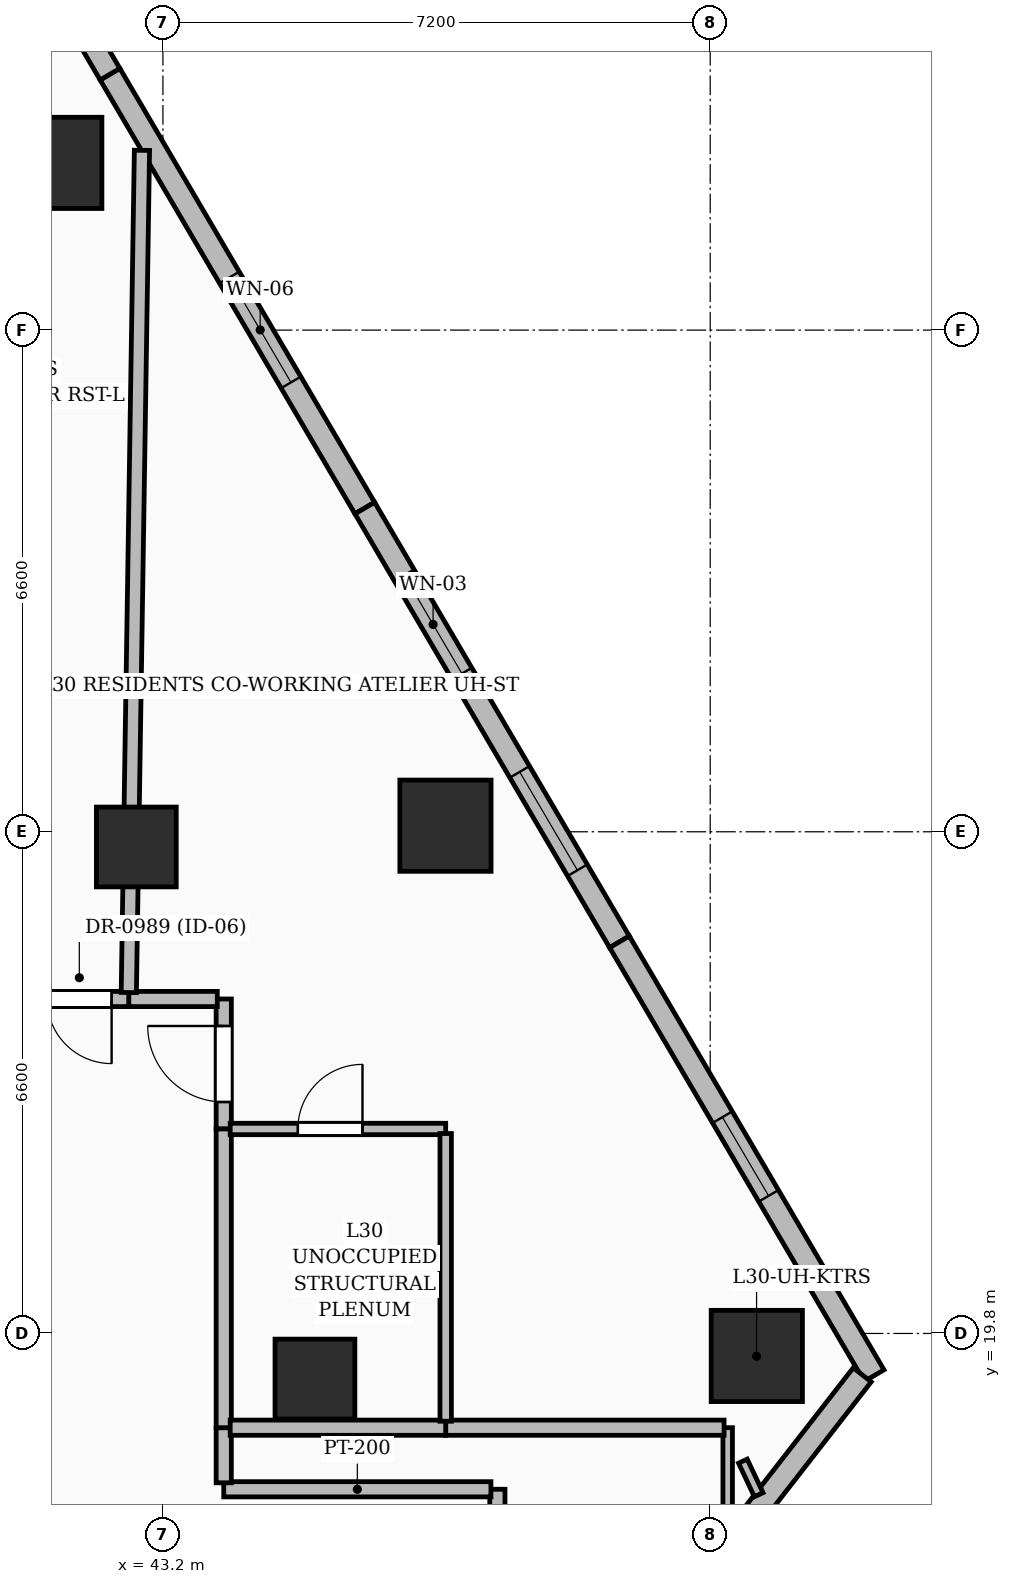
"""IFC4 building model, lengths in metres.
Left out: names, types, materials, properties, quantities, classifications, styles, units other than length and angle.
Written with IfcOpenShell. Run it as: python <this file> out.ifc"""

import sys

from ifc_helpers import new_model, si_unit, direction, frame, frame_2d, origin, origin_2d, place, context, subcontext, project, spatial, rectangle, extrude, element, fill, save


model = new_model("IFC4")
c1 = context("Model", 3, precision=1e-05, world=origin(), true_north=direction((0.0, 1.0)))
c2 = subcontext(c1, "Body", "Model", "MODEL_VIEW")
j1 = project(units=[si_unit("LENGTHUNIT", "METRE"), si_unit("PLANEANGLEUNIT", "RADIAN")], contexts=[c1])
p1 = place(None, origin())
s1 = spatial("IfcSite", under=j1, at=p1, CompositionType="ELEMENT")
p2 = place(p1, origin())
s2 = spatial("IfcBuilding", under=s1, at=p2, CompositionType="ELEMENT")
p3 = place(p2, frame((0.0, 0.0, 121.2)))
s3 = spatial("IfcBuildingStorey", under=s2, at=p3, CompositionType="ELEMENT", Elevation=121.2)
for number, where, z_axis, x_axis in (
    (1, (45.2, 19.2, 0.0), (0.0, 0.0, 1.0), (1.0, 0.0, 0.0)),
    (2, (42.85, 26.2, 0.0), (0.0, 0.0, 1.0), (1.0, 0.0, 0.0)),
):
    element("IfcColumn", number, at=place(p3, frame(where, z_axis=z_axis, x_axis=x_axis)), inside=s3, PredefinedType="COLUMN", context=c2, shape_type="SweptSolid", body=[
        extrude(rectangle(XDim=1.05, YDim=1.05, at=origin_2d()), origin(), (0.0, 0.0, 1.0), 3.6),
    ])
for number, where, z_axis, x_axis in (
    (3, (51.013, 19.504, 0.0), (0.0, 0.0, 1.0), (1.0, 0.0, 0.0)),
    (4, (46.917, 26.48, 0.0), (0.0, 0.0, 1.0), (1.0, 0.0, 0.0)),
    (5, (41.797, 35.2, 0.0), (0.0, 0.0, 1.0), (1.0, 0.0, 0.0)),
):
    element("IfcColumn", number, at=place(p3, frame(where, z_axis=z_axis, x_axis=x_axis)), inside=s3, PredefinedType="COLUMN", context=c2, shape_type="SweptSolid", body=[
        extrude(rectangle(XDim=1.2, YDim=1.2, at=origin_2d()), origin(), (0.0, 0.0, 1.0), 3.6),
    ])
p4 = place(p3, frame((39.443, 41.58, 0.0), z_axis=(0.0, 0.0, 1.0), x_axis=(0.506351339064, -0.862327270489, 0.0)))
e6 = element("IfcWall", 6, at=p4, inside=s3, PredefinedType="SOLIDWALL", context=c2, shape_type="SweptSolid", body=[
    extrude(rectangle(XDim=6.048, YDim=0.3, at=frame_2d((3.024, 0.0))), origin(), (0.0, 0.0, 1.0), 3.35),
])
p5 = place(p4, frame((2.43, 0.0, 0.6)))
e7 = element("IfcOpeningElement", 7, at=p5, cuts=e6, PredefinedType="OPENING", context=c2, shape_type="SweptSolid", body=[
    extrude(rectangle(XDim=1.8, YDim=2.1, at=frame_2d((0.9, 1.05))), frame((0.0, 0.16, 0.0), z_axis=(0.0, -1.0, 0.0), x_axis=(1.0, 0.0, 0.0)), (0.0, 0.0, 1.0), 0.32),
])
p6 = place(p3, frame((42.505, 36.365, 0.0), z_axis=(0.0, 0.0, 1.0), x_axis=(0.506323446146, -0.862343648369, 0.0)))
e8 = element("IfcWall", 8, at=p6, inside=s3, PredefinedType="SOLIDWALL", context=c2, shape_type="SweptSolid", body=[
    extrude(rectangle(XDim=6.617, YDim=0.3, at=frame_2d((3.309, 0.0))), origin(), (0.0, 0.0, 1.0), 3.35),
])
p7 = place(p6, frame((3.1, 0.0, 0.55)))
e9 = element("IfcOpeningElement", 9, at=p7, cuts=e8, PredefinedType="OPENING", context=c2, shape_type="SweptSolid", body=[
    extrude(rectangle(XDim=1.6, YDim=2.2, at=frame_2d((0.8, 1.1))), frame((0.0, 0.16, 0.0), z_axis=(0.0, -1.0, 0.0), x_axis=(1.0, 0.0, 0.0)), (0.0, 0.0, 1.0), 0.32),
])
p8 = place(p3, frame((45.855, 30.658, 0.0), z_axis=(0.0, 0.0, 1.0), x_axis=(0.506350880573, -0.86232753971, 0.0)))
e10 = element("IfcWall", 10, at=p8, inside=s3, PredefinedType="SOLIDWALL", context=c2, shape_type="SweptSolid", body=[
    extrude(rectangle(XDim=6.618, YDim=0.3, at=frame_2d((3.309, 0.0))), origin(), (0.0, 0.0, 1.0), 3.35),
])
p9 = place(p8, frame((1.025, 0.0, 0.6)))
e11 = element("IfcOpeningElement", 11, at=p9, cuts=e10, PredefinedType="OPENING", context=c2, shape_type="SweptSolid", body=[
    extrude(rectangle(XDim=1.5, YDim=2.1, at=frame_2d((0.75, 1.05))), frame((0.0, 0.16, 0.0), z_axis=(0.0, -1.0, 0.0), x_axis=(1.0, 0.0, 0.0)), (0.0, 0.0, 1.0), 0.32),
])
p10 = place(p8, frame((4.025, 0.0, 0.6)))
e12 = element("IfcOpeningElement", 12, at=p10, cuts=e10, PredefinedType="OPENING", context=c2, shape_type="SweptSolid", body=[
    extrude(rectangle(XDim=1.5, YDim=2.1, at=frame_2d((0.75, 1.05))), frame((0.0, 0.16, 0.0), z_axis=(0.0, -1.0, 0.0), x_axis=(1.0, 0.0, 0.0)), (0.0, 0.0, 1.0), 0.32),
])
p11 = place(p3, frame((49.206, 24.952, 0.0), z_axis=(0.0, 0.0, 1.0), x_axis=(0.506323446146, -0.862343648369, 0.0)))
e13 = element("IfcWall", 13, at=p11, inside=s3, PredefinedType="SOLIDWALL", context=c2, shape_type="SweptSolid", body=[
    extrude(rectangle(XDim=6.617, YDim=0.3, at=frame_2d((3.309, 0.0))), origin(), (0.0, 0.0, 1.0), 3.35),
])
p12 = place(p11, frame((2.675, 0.0, 0.8)))
e14 = element("IfcOpeningElement", 14, at=p12, cuts=e13, PredefinedType="OPENING", context=c2, shape_type="SweptSolid", body=[
    extrude(rectangle(XDim=1.2, YDim=1.8, at=frame_2d((0.6, 0.9))), frame((0.0, 0.16, 0.0), z_axis=(0.0, -1.0, 0.0), x_axis=(1.0, 0.0, 0.0)), (0.0, 0.0, 1.0), 0.32),
])
p13 = place(p3, frame((52.4, 19.256, 0.0), z_axis=(0.0, 0.0, 1.0), x_axis=(-0.61408669817, -0.78923857428, 0.0)))
e15 = element("IfcWall", 15, at=p13, inside=s3, PredefinedType="SOLIDWALL", context=c2, shape_type="SweptSolid", body=[
    extrude(rectangle(XDim=2.314, YDim=0.3, at=frame_2d((1.157, 0.0))), origin(), (0.0, 0.0, 1.0), 2.575),
])
p14 = place(p3, frame((47.6, 16.12, 0.0), z_axis=(0.0, 0.0, 1.0), x_axis=(0.0, 1.0, 0.0)))
e16 = element("IfcWall", 16, at=p14, inside=s3, PredefinedType="PARTITIONING", context=c2, shape_type="SweptSolid", body=[
    extrude(rectangle(XDim=1.63, YDim=0.2, at=frame_2d((0.815, 0.0))), origin(), (0.0, 0.0, 1.0), 3.35),
])
p15 = place(p3, frame((47.515, 17.75, 0.0), z_axis=(0.0, 0.0, 1.0), x_axis=(-1.0, 0.0, 0.0)))
e17 = element("IfcWall", 17, at=p15, inside=s3, PredefinedType="PARTITIONING", context=c2, shape_type="SweptSolid", body=[
    extrude(rectangle(XDim=3.515, YDim=0.2, at=frame_2d((1.757, 0.0))), origin(), (0.0, 0.0, 1.0), 2.436),
])
p16 = place(p3, frame((44.0, 17.835, 0.0), z_axis=(0.0, 0.0, 1.0), x_axis=(0.0, 1.0, 0.0)))
e18 = element("IfcWall", 18, at=p16, inside=s3, PredefinedType="PARTITIONING", context=c2, shape_type="SweptSolid", body=[
    extrude(rectangle(XDim=0.725, YDim=0.2, at=frame_2d((0.363, 0.0))), origin(), (0.0, 0.0, 1.0), 3.35),
])
p17 = place(p3, frame((44.0, 22.49, 0.0), z_axis=(0.0, 0.0, 1.0), x_axis=(0.0, 1.0, 0.0)))
e19 = element("IfcWall", 19, at=p17, inside=s3, PredefinedType="PARTITIONING", context=c2, shape_type="SweptSolid", body=[
    extrude(rectangle(XDim=1.71, YDim=0.2, at=frame_2d((0.855, 0.0))), origin(), (0.0, 0.0, 1.0), 2.436),
])
p18 = place(p17, frame((0.355, 0.0, 0.0)))
e20 = element("IfcOpeningElement", 20, at=p18, cuts=e19, PredefinedType="OPENING", context=c2, shape_type="SweptSolid", body=[
    extrude(rectangle(XDim=1.0, YDim=2.2, at=frame_2d((0.5, 1.1))), frame((0.0, 0.11, 0.0), z_axis=(0.0, -1.0, 0.0), x_axis=(1.0, 0.0, 0.0)), (0.0, 0.0, 1.0), 0.22),
])
p19 = place(p3, frame((43.915, 24.2, 0.0), z_axis=(0.0, 0.0, 1.0), x_axis=(-1.0, 0.0, 0.0)))
e21 = element("IfcWall", 21, at=p19, inside=s3, PredefinedType="PARTITIONING", context=c2, shape_type="SweptSolid", body=[
    extrude(rectangle(XDim=1.165, YDim=0.2, at=frame_2d((0.583, 0.0))), origin(), (0.0, 0.0, 1.0), 2.436),
])
p20 = place(p3, frame((44.0, 18.56, 0.0), z_axis=(0.0, 0.0, 1.0), x_axis=(0.0, 1.0, 0.0)))
e22 = element("IfcWall", 22, at=p20, inside=s3, PredefinedType="PARTITIONING", context=c2, shape_type="SweptSolid", body=[
    extrude(rectangle(XDim=3.93, YDim=0.2, at=frame_2d((1.965, 0.0))), origin(), (0.0, 0.0, 1.0), 2.436),
])
p21 = place(p3, frame((42.75, 24.2, 0.0), z_axis=(0.0, 0.0, 1.0), x_axis=(-1.0, 0.0, 0.0)))
e23 = element("IfcWall", 23, at=p21, inside=s3, PredefinedType="PARTITIONING", context=c2, shape_type="SweptSolid", body=[
    extrude(rectangle(XDim=1.3, YDim=0.2, at=frame_2d((0.65, 0.0))), origin(), (0.0, 0.0, 1.0), 3.35),
])
p22 = place(p21, frame((0.225, 0.0, 0.0)))
e24 = element("IfcOpeningElement", 24, at=p22, cuts=e23, PredefinedType="OPENING", context=c2, shape_type="SweptSolid", body=[
    extrude(rectangle(XDim=0.85, YDim=2.1, at=frame_2d((0.425, 1.05))), frame((0.0, 0.11, 0.0), z_axis=(0.0, -1.0, 0.0), x_axis=(1.0, 0.0, 0.0)), (0.0, 0.0, 1.0), 0.22),
])
p23 = place(p3, frame((50.63, 13.89, 0.0), z_axis=(0.0, 0.0, 1.0), x_axis=(0.0, 1.0, 0.0)))
e25 = element("IfcWall", 25, at=p23, inside=s3, PredefinedType="PARTITIONING", context=c2, shape_type="SweptSolid", body=[
    extrude(rectangle(XDim=4.67, YDim=0.125, at=frame_2d((2.335, 0.0))), origin(), (0.0, 0.0, 1.0), 2.787),
])
p24 = place(p3, frame((50.583, 18.56, 0.0), z_axis=(0.0, 0.0, 1.0), x_axis=(-1.0, 0.0, 0.0)))
e26 = element("IfcWall", 26, at=p24, inside=s3, PredefinedType="PARTITIONING", context=c2, shape_type="SweptSolid", body=[
    extrude(rectangle(XDim=3.663, YDim=0.2, at=frame_2d((1.831, 0.0))), origin(), (0.0, 0.0, 1.0), 2.372),
])
p25 = place(p3, frame((46.92, 18.56, 0.0), z_axis=(0.0, 0.0, 1.0), x_axis=(-1.0, 0.0, 0.0)))
e27 = element("IfcWall", 27, at=p25, inside=s3, PredefinedType="PARTITIONING", context=c2, shape_type="SweptSolid", body=[
    extrude(rectangle(XDim=2.835, YDim=0.2, at=frame_2d((1.417, 0.0))), origin(), (0.0, 0.0, 1.0), 2.436),
])
p26 = place(p3, frame((44.085, 22.49, 0.0), z_axis=(0.0, 0.0, 1.0), x_axis=(1.0, 0.0, 0.0)))
e28 = element("IfcWall", 28, at=p26, inside=s3, PredefinedType="PARTITIONING", context=c2, shape_type="SweptSolid", body=[
    extrude(rectangle(XDim=2.835, YDim=0.15, at=frame_2d((1.417, 0.0))), origin(), (0.0, 0.0, 1.0), 2.372),
])
p27 = place(p26, frame((0.89, 0.0, 0.0)))
e29 = element("IfcOpeningElement", 29, at=p27, cuts=e28, PredefinedType="OPENING", context=c2, shape_type="SweptSolid", body=[
    extrude(rectangle(XDim=0.85, YDim=2.1, at=frame_2d((0.425, 1.05))), frame((0.0, 0.085, 0.0), z_axis=(0.0, -1.0, 0.0), x_axis=(1.0, 0.0, 0.0)), (0.0, 0.0, 1.0), 0.17),
])
p28 = place(p3, frame((42.924, 35.365, 0.0), z_axis=(0.0, 0.0, 1.0), x_axis=(-0.015620339734, -0.999877995051, 0.0)))
e30 = element("IfcWall", 30, at=p28, inside=s3, PredefinedType="PARTITIONING", context=c2, shape_type="SweptSolid", body=[
    extrude(rectangle(XDim=11.082, YDim=0.2, at=frame_2d((5.541, 0.0))), origin(), (0.0, 0.0, 1.0), 2.372),
])
p29 = place(p3, frame((46.92, 22.43, 0.0), z_axis=(0.0, 0.0, 1.0), x_axis=(0.0, -1.0, 0.0)))
e31 = element("IfcWall", 31, at=p29, inside=s3, PredefinedType="PARTITIONING", context=c2, shape_type="SweptSolid", body=[
    extrude(rectangle(XDim=3.785, YDim=0.15, at=frame_2d((1.893, 0.0))), origin(), (0.0, 0.0, 1.0), 2.787),
])
p30 = place(p3, frame((51.038, 17.678, 0.0), z_axis=(0.0, 0.0, 1.0), x_axis=(-0.425700784292, 0.904863991025, 0.0)))
e32 = element("IfcWall", 32, at=p30, inside=s3, PredefinedType="PARTITIONING", context=c2, shape_type="SweptSolid", body=[
    extrude(rectangle(XDim=0.489, YDim=0.125, at=frame_2d((0.244, 0.0))), origin(), (0.0, 0.0, 1.0), 3.35),
])
p31 = place(p7, origin())
e33 = element("IfcWindow", 33, at=p31, inside=s3, PartitioningType="SINGLE_PANEL", PredefinedType="WINDOW", context=c2, shape_type="SweptSolid", body=[
    extrude(rectangle(XDim=1.6, YDim=2.2, at=frame_2d((0.8, 1.1))), frame((0.0, 0.03, 0.0), z_axis=(0.0, -1.0, 0.0), x_axis=(1.0, 0.0, 0.0)), (0.0, 0.0, 1.0), 0.06),
])
fill(e9, e33)
p32 = place(p9, origin())
e34 = element("IfcWindow", 34, at=p32, inside=s3, PartitioningType="SINGLE_PANEL", PredefinedType="WINDOW", context=c2, shape_type="SweptSolid", body=[
    extrude(rectangle(XDim=1.5, YDim=2.1, at=frame_2d((0.75, 1.05))), frame((0.0, 0.03, 0.0), z_axis=(0.0, -1.0, 0.0), x_axis=(1.0, 0.0, 0.0)), (0.0, 0.0, 1.0), 0.06),
])
fill(e11, e34)
p33 = place(p10, origin())
e35 = element("IfcWindow", 35, at=p33, inside=s3, PartitioningType="SINGLE_PANEL", PredefinedType="WINDOW", context=c2, shape_type="SweptSolid", body=[
    extrude(rectangle(XDim=1.5, YDim=2.1, at=frame_2d((0.75, 1.05))), frame((0.0, 0.03, 0.0), z_axis=(0.0, -1.0, 0.0), x_axis=(1.0, 0.0, 0.0)), (0.0, 0.0, 1.0), 0.06),
])
fill(e12, e35)
p34 = place(p12, origin())
e36 = element("IfcWindow", 36, at=p34, inside=s3, PartitioningType="SINGLE_PANEL", PredefinedType="WINDOW", context=c2, shape_type="SweptSolid", body=[
    extrude(rectangle(XDim=1.2, YDim=1.8, at=frame_2d((0.6, 0.9))), frame((0.0, 0.03, 0.0), z_axis=(0.0, -1.0, 0.0), x_axis=(1.0, 0.0, 0.0)), (0.0, 0.0, 1.0), 0.06),
])
fill(e14, e36)
p35 = place(p22, origin())
e37 = element("IfcDoor", 37, at=p35, inside=s3, OperationType="SINGLE_SWING_LEFT", PredefinedType="DOOR", context=c2, shape_type="SweptSolid", body=[
    extrude(rectangle(XDim=0.85, YDim=2.1, at=frame_2d((0.425, 1.05))), frame((0.0, 0.025, 0.0), z_axis=(0.0, -1.0, 0.0), x_axis=(1.0, 0.0, 0.0)), (0.0, 0.0, 1.0), 0.05),
])
fill(e24, e37)
p36 = place(p18, origin())
e38 = element("IfcDoor", 38, at=p36, inside=s3, OperationType="SINGLE_SWING_RIGHT", PredefinedType="DOOR", context=c2, shape_type="SweptSolid", body=[
    extrude(rectangle(XDim=1.0, YDim=2.2, at=frame_2d((0.5, 1.1))), frame((0.0, 0.025, 0.0), z_axis=(0.0, -1.0, 0.0), x_axis=(1.0, 0.0, 0.0)), (0.0, 0.0, 1.0), 0.05),
])
fill(e20, e38)
p37 = place(p27, origin())
e39 = element("IfcDoor", 39, at=p37, inside=s3, OperationType="SINGLE_SWING_RIGHT", PredefinedType="DOOR", context=c2, shape_type="SweptSolid", body=[
    extrude(rectangle(XDim=0.85, YDim=2.1, at=frame_2d((0.425, 1.05))), frame((0.0, 0.025, 0.0), z_axis=(0.0, -1.0, 0.0), x_axis=(1.0, 0.0, 0.0)), (0.0, 0.0, 1.0), 0.05),
])
fill(e29, e39)
save(model, sys.argv[1])
